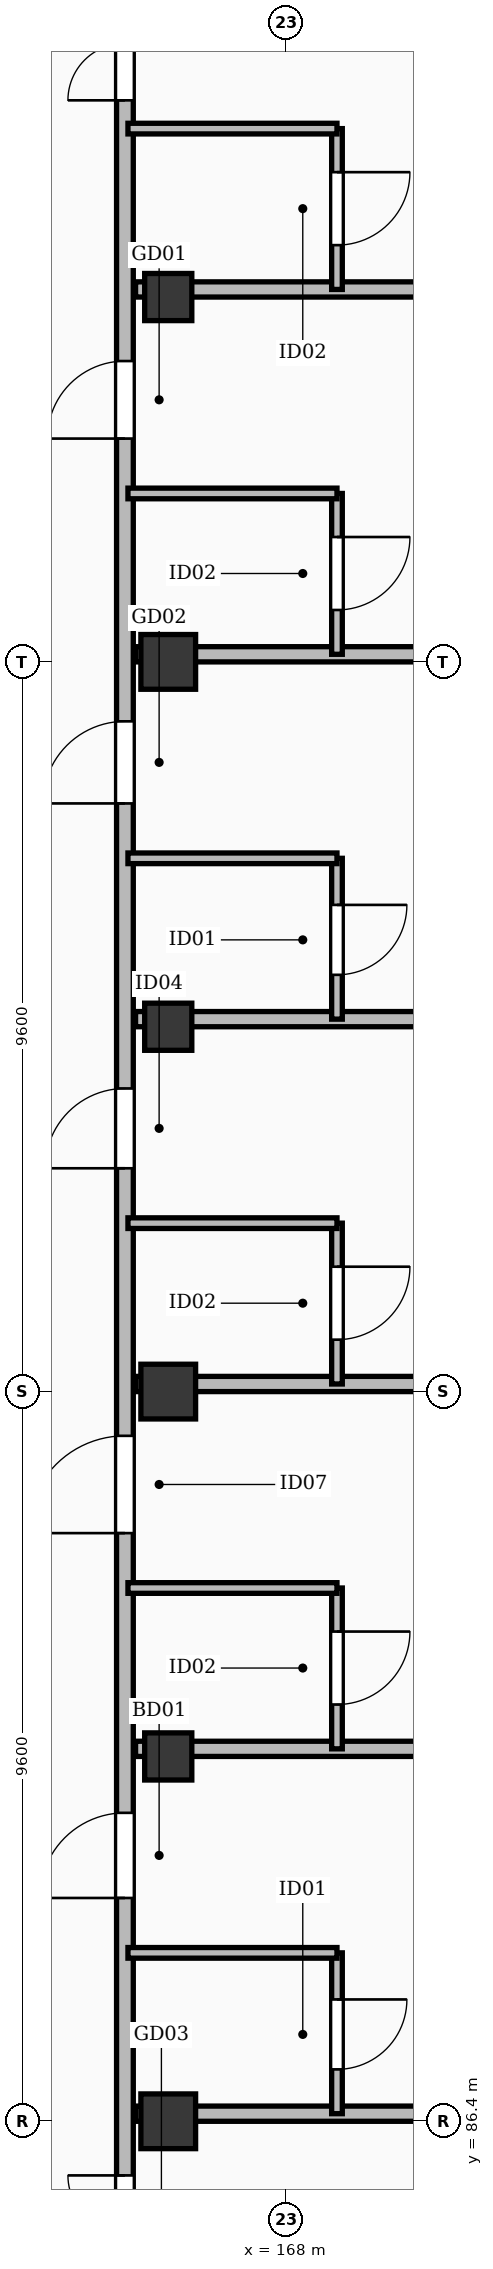
"""IFC4 building model, lengths in metres.
Left out: names, types, materials, properties, quantities, classifications, styles, units other than length and angle.
Written with IfcOpenShell. Run it as: python <this file> out.ifc"""

import sys

from ifc_helpers import new_model, si_unit, direction, frame, frame_2d, origin, origin_2d, place, context, subcontext, project, spatial, rectangle, extrude, element, fill, save


model = new_model("IFC4")
c1 = context("Model", 3, precision=1e-05, world=origin(), true_north=direction((0.0, 1.0)))
c2 = subcontext(c1, "Body", "Model", "MODEL_VIEW")
j1 = project(units=[si_unit("LENGTHUNIT", "METRE"), si_unit("PLANEANGLEUNIT", "RADIAN")], contexts=[c1])
p1 = place(None, origin())
s1 = spatial("IfcSite", under=j1, at=p1, CompositionType="ELEMENT")
p2 = place(p1, origin())
s2 = spatial("IfcBuilding", under=s1, at=p2, CompositionType="ELEMENT")
p3 = place(p2, frame((0.0, 0.0, 31.8)))
s3 = spatial("IfcBuildingStorey", under=s2, at=p3, CompositionType="ELEMENT", Elevation=31.8)
for number, where, z_axis, x_axis in (
    (1, (166.45, 86.4, 0.0), (0.0, 0.0, 1.0), (1.0, 0.0, 0.0)),
    (2, (166.45, 96.0, 0.0), (0.0, 0.0, 1.0), (1.0, 0.0, 0.0)),
    (3, (166.45, 105.6, 0.0), (0.0, 0.0, 1.0), (1.0, 0.0, 0.0)),
):
    element("IfcColumn", number, at=place(p3, frame(where, z_axis=z_axis, x_axis=x_axis)), inside=s3, PredefinedType="COLUMN", context=c2, shape_type="SweptSolid", body=[
        extrude(rectangle(XDim=0.72, YDim=0.72, at=origin_2d()), origin(), (0.0, 0.0, 1.0), 3.6),
    ])
for number, where, z_axis, x_axis in (
    (4, (166.45, 91.2, 0.0), (0.0, 0.0, 1.0), (1.0, 0.0, 0.0)),
    (5, (166.45, 100.8, 0.0), (0.0, 0.0, 1.0), (1.0, 0.0, 0.0)),
    (6, (166.45, 110.4, 0.0), (0.0, 0.0, 1.0), (1.0, 0.0, 0.0)),
):
    element("IfcColumn", number, at=place(p3, frame(where, z_axis=z_axis, x_axis=x_axis)), inside=s3, PredefinedType="COLUMN", context=c2, shape_type="SweptSolid", body=[
        extrude(rectangle(XDim=0.62, YDim=0.62, at=origin_2d()), origin(), (0.0, 0.0, 1.0), 3.6),
    ])
p4 = place(p3, frame((165.88, 48.35, 0.0), z_axis=(0.0, 0.0, 1.0), x_axis=(0.0, 1.0, 0.0)))
e7 = element("IfcWall", 7, at=p4, inside=s3, PredefinedType="PARTITIONING", context=c2, shape_type="SweptSolid", body=[
    extrude(rectangle(XDim=77.3, YDim=0.22, at=frame_2d((38.65, 0.0))), origin(), (0.0, 0.0, 1.0), 2.602),
])
p5 = place(p4, frame((5.15, 0.0, 0.0)))
e8 = element("IfcOpeningElement", 8, at=p5, cuts=e7, PredefinedType="OPENING", context=c2, shape_type="SweptSolid", body=[
    extrude(rectangle(XDim=1.14, YDim=2.26, at=frame_2d((0.57, 1.13))), frame((0.0, 0.122, 0.0), z_axis=(0.0, -1.0, 0.0), x_axis=(1.0, 0.0, 0.0)), (0.0, 0.0, 1.0), 0.244),
])
p6 = place(p4, frame((12.188, 0.0, 0.0)))
e9 = element("IfcOpeningElement", 9, at=p6, cuts=e7, PredefinedType="OPENING", context=c2, shape_type="SweptSolid", body=[
    extrude(rectangle(XDim=1.12, YDim=2.15, at=frame_2d((0.56, 1.075))), frame((0.0, 0.122, 0.0), z_axis=(0.0, -1.0, 0.0), x_axis=(1.0, 0.0, 0.0)), (0.0, 0.0, 1.0), 0.244),
])
p7 = place(p4, frame((16.988, 0.0, 0.0)))
e10 = element("IfcOpeningElement", 10, at=p7, cuts=e7, PredefinedType="OPENING", context=c2, shape_type="SweptSolid", body=[
    extrude(rectangle(XDim=1.28, YDim=2.16, at=frame_2d((0.64, 1.08))), frame((0.0, 0.122, 0.0), z_axis=(0.0, -1.0, 0.0), x_axis=(1.0, 0.0, 0.0)), (0.0, 0.0, 1.0), 0.244),
])
p8 = place(p4, frame((21.788, 0.0, 0.0)))
e11 = element("IfcOpeningElement", 11, at=p8, cuts=e7, PredefinedType="OPENING", context=c2, shape_type="SweptSolid", body=[
    extrude(rectangle(XDim=1.05, YDim=2.18, at=frame_2d((0.525, 1.09))), frame((0.0, 0.122, 0.0), z_axis=(0.0, -1.0, 0.0), x_axis=(1.0, 0.0, 0.0)), (0.0, 0.0, 1.0), 0.244),
])
p9 = place(p4, frame((26.588, 0.0, 0.0)))
e12 = element("IfcOpeningElement", 12, at=p9, cuts=e7, PredefinedType="OPENING", context=c2, shape_type="SweptSolid", body=[
    extrude(rectangle(XDim=1.08, YDim=2.25, at=frame_2d((0.54, 1.125))), frame((0.0, 0.122, 0.0), z_axis=(0.0, -1.0, 0.0), x_axis=(1.0, 0.0, 0.0)), (0.0, 0.0, 1.0), 0.244),
])
p10 = place(p4, frame((31.388, 0.0, 0.0)))
e13 = element("IfcOpeningElement", 13, at=p10, cuts=e7, PredefinedType="OPENING", context=c2, shape_type="SweptSolid", body=[
    extrude(rectangle(XDim=1.02, YDim=2.2, at=frame_2d((0.51, 1.1))), frame((0.0, 0.122, 0.0), z_axis=(0.0, -1.0, 0.0), x_axis=(1.0, 0.0, 0.0)), (0.0, 0.0, 1.0), 0.244),
])
p11 = place(p4, frame((35.838, 0.0, 0.0)))
e14 = element("IfcOpeningElement", 14, at=p11, cuts=e7, PredefinedType="OPENING", context=c2, shape_type="SweptSolid", body=[
    extrude(rectangle(XDim=1.5, YDim=2.3, at=frame_2d((0.75, 1.15))), frame((0.0, 0.122, 0.0), z_axis=(0.0, -1.0, 0.0), x_axis=(1.0, 0.0, 0.0)), (0.0, 0.0, 1.0), 0.244),
])
p12 = place(p4, frame((40.988, 0.0, 0.0)))
e15 = element("IfcOpeningElement", 15, at=p12, cuts=e7, PredefinedType="OPENING", context=c2, shape_type="SweptSolid", body=[
    extrude(rectangle(XDim=1.12, YDim=2.15, at=frame_2d((0.56, 1.075))), frame((0.0, 0.122, 0.0), z_axis=(0.0, -1.0, 0.0), x_axis=(1.0, 0.0, 0.0)), (0.0, 0.0, 1.0), 0.244),
])
p13 = place(p4, frame((45.788, 0.0, 0.0)))
e16 = element("IfcOpeningElement", 16, at=p13, cuts=e7, PredefinedType="OPENING", context=c2, shape_type="SweptSolid", body=[
    extrude(rectangle(XDim=1.28, YDim=2.16, at=frame_2d((0.64, 1.08))), frame((0.0, 0.122, 0.0), z_axis=(0.0, -1.0, 0.0), x_axis=(1.0, 0.0, 0.0)), (0.0, 0.0, 1.0), 0.244),
])
p14 = place(p4, frame((50.588, 0.0, 0.0)))
e17 = element("IfcOpeningElement", 17, at=p14, cuts=e7, PredefinedType="OPENING", context=c2, shape_type="SweptSolid", body=[
    extrude(rectangle(XDim=1.05, YDim=2.18, at=frame_2d((0.525, 1.09))), frame((0.0, 0.122, 0.0), z_axis=(0.0, -1.0, 0.0), x_axis=(1.0, 0.0, 0.0)), (0.0, 0.0, 1.0), 0.244),
])
p15 = place(p4, frame((55.388, 0.0, 0.0)))
e18 = element("IfcOpeningElement", 18, at=p15, cuts=e7, PredefinedType="OPENING", context=c2, shape_type="SweptSolid", body=[
    extrude(rectangle(XDim=1.08, YDim=2.25, at=frame_2d((0.54, 1.125))), frame((0.0, 0.122, 0.0), z_axis=(0.0, -1.0, 0.0), x_axis=(1.0, 0.0, 0.0)), (0.0, 0.0, 1.0), 0.244),
])
p16 = place(p4, frame((60.188, 0.0, 0.0)))
e19 = element("IfcOpeningElement", 19, at=p16, cuts=e7, PredefinedType="OPENING", context=c2, shape_type="SweptSolid", body=[
    extrude(rectangle(XDim=1.02, YDim=2.2, at=frame_2d((0.51, 1.1))), frame((0.0, 0.122, 0.0), z_axis=(0.0, -1.0, 0.0), x_axis=(1.0, 0.0, 0.0)), (0.0, 0.0, 1.0), 0.244),
])
p17 = place(p4, frame((64.638, 0.0, 0.0)))
e20 = element("IfcOpeningElement", 20, at=p17, cuts=e7, PredefinedType="OPENING", context=c2, shape_type="SweptSolid", body=[
    extrude(rectangle(XDim=1.5, YDim=2.3, at=frame_2d((0.75, 1.15))), frame((0.0, 0.122, 0.0), z_axis=(0.0, -1.0, 0.0), x_axis=(1.0, 0.0, 0.0)), (0.0, 0.0, 1.0), 0.244),
])
p18 = place(p4, frame((69.788, 0.0, 0.0)))
e21 = element("IfcOpeningElement", 21, at=p18, cuts=e7, PredefinedType="OPENING", context=c2, shape_type="SweptSolid", body=[
    extrude(rectangle(XDim=1.12, YDim=2.15, at=frame_2d((0.56, 1.075))), frame((0.0, 0.122, 0.0), z_axis=(0.0, -1.0, 0.0), x_axis=(1.0, 0.0, 0.0)), (0.0, 0.0, 1.0), 0.244),
])
p19 = place(p4, frame((74.588, 0.0, 0.0)))
e22 = element("IfcOpeningElement", 22, at=p19, cuts=e7, PredefinedType="OPENING", context=c2, shape_type="SweptSolid", body=[
    extrude(rectangle(XDim=1.28, YDim=2.16, at=frame_2d((0.64, 1.08))), frame((0.0, 0.122, 0.0), z_axis=(0.0, -1.0, 0.0), x_axis=(1.0, 0.0, 0.0)), (0.0, 0.0, 1.0), 0.244),
])
p20 = place(p3, frame((166.02, 86.5, 0.0), z_axis=(0.0, 0.0, 1.0), x_axis=(1.0, 0.0, 0.0)))
e23 = element("IfcWall", 23, at=p20, inside=s3, PredefinedType="PARTITIONING", context=c2, shape_type="SweptSolid", body=[
    extrude(rectangle(XDim=13.23, YDim=0.2, at=frame_2d((6.615, 0.0))), origin(), (0.0, 0.0, 1.0), 2.602),
])
p21 = place(p3, frame((168.67, 86.5, 0.0), z_axis=(0.0, 0.0, 1.0), x_axis=(0.0, 1.0, 0.0)))
e24 = element("IfcWall", 24, at=p21, inside=s3, PredefinedType="PARTITIONING", context=c2, shape_type="SweptSolid", body=[
    extrude(rectangle(XDim=2.116, YDim=0.14, at=frame_2d((1.058, 0.0))), origin(), (0.0, 0.0, 1.0), 2.732),
])
p22 = place(p21, frame((0.583, 0.0, 0.0)))
e25 = element("IfcOpeningElement", 25, at=p22, cuts=e24, PredefinedType="OPENING", context=c2, shape_type="SweptSolid", body=[
    extrude(rectangle(XDim=0.92, YDim=2.1, at=frame_2d((0.46, 1.05))), frame((0.0, 0.082, 0.0), z_axis=(0.0, -1.0, 0.0), x_axis=(1.0, 0.0, 0.0)), (0.0, 0.0, 1.0), 0.164),
])
p23 = place(p3, frame((165.92, 88.616, 0.0), z_axis=(0.0, 0.0, 1.0), x_axis=(1.0, 0.0, 0.0)))
e26 = element("IfcWall", 26, at=p23, inside=s3, PredefinedType="PARTITIONING", context=c2, shape_type="SweptSolid", body=[
    extrude(rectangle(XDim=2.75, YDim=0.14, at=frame_2d((1.375, 0.0))), origin(), (0.0, 0.0, 1.0), 2.732),
])
p24 = place(p3, frame((166.02, 91.3, 0.0), z_axis=(0.0, 0.0, 1.0), x_axis=(1.0, 0.0, 0.0)))
e27 = element("IfcWall", 27, at=p24, inside=s3, PredefinedType="PARTITIONING", context=c2, shape_type="SweptSolid", body=[
    extrude(rectangle(XDim=13.23, YDim=0.2, at=frame_2d((6.615, 0.0))), origin(), (0.0, 0.0, 1.0), 2.602),
])
p25 = place(p3, frame((168.67, 91.3, 0.0), z_axis=(0.0, 0.0, 1.0), x_axis=(0.0, 1.0, 0.0)))
e28 = element("IfcWall", 28, at=p25, inside=s3, PredefinedType="PARTITIONING", context=c2, shape_type="SweptSolid", body=[
    extrude(rectangle(XDim=2.116, YDim=0.14, at=frame_2d((1.058, 0.0))), origin(), (0.0, 0.0, 1.0), 2.732),
])
p26 = place(p25, frame((0.583, 0.0, 0.0)))
e29 = element("IfcOpeningElement", 29, at=p26, cuts=e28, PredefinedType="OPENING", context=c2, shape_type="SweptSolid", body=[
    extrude(rectangle(XDim=0.96, YDim=2.12, at=frame_2d((0.48, 1.06))), frame((0.0, 0.082, 0.0), z_axis=(0.0, -1.0, 0.0), x_axis=(1.0, 0.0, 0.0)), (0.0, 0.0, 1.0), 0.164),
])
p27 = place(p3, frame((165.92, 93.416, 0.0), z_axis=(0.0, 0.0, 1.0), x_axis=(1.0, 0.0, 0.0)))
e30 = element("IfcWall", 30, at=p27, inside=s3, PredefinedType="PARTITIONING", context=c2, shape_type="SweptSolid", body=[
    extrude(rectangle(XDim=2.75, YDim=0.14, at=frame_2d((1.375, 0.0))), origin(), (0.0, 0.0, 1.0), 2.732),
])
p28 = place(p3, frame((166.02, 96.1, 0.0), z_axis=(0.0, 0.0, 1.0), x_axis=(1.0, 0.0, 0.0)))
e31 = element("IfcWall", 31, at=p28, inside=s3, PredefinedType="PARTITIONING", context=c2, shape_type="SweptSolid", body=[
    extrude(rectangle(XDim=13.23, YDim=0.2, at=frame_2d((6.615, 0.0))), origin(), (0.0, 0.0, 1.0), 2.602),
])
p29 = place(p3, frame((168.67, 96.1, 0.0), z_axis=(0.0, 0.0, 1.0), x_axis=(0.0, 1.0, 0.0)))
e32 = element("IfcWall", 32, at=p29, inside=s3, PredefinedType="PARTITIONING", context=c2, shape_type="SweptSolid", body=[
    extrude(rectangle(XDim=2.116, YDim=0.14, at=frame_2d((1.058, 0.0))), origin(), (0.0, 0.0, 1.0), 2.732),
])
p30 = place(p29, frame((0.583, 0.0, 0.0)))
e33 = element("IfcOpeningElement", 33, at=p30, cuts=e32, PredefinedType="OPENING", context=c2, shape_type="SweptSolid", body=[
    extrude(rectangle(XDim=0.96, YDim=2.12, at=frame_2d((0.48, 1.06))), frame((0.0, 0.082, 0.0), z_axis=(0.0, -1.0, 0.0), x_axis=(1.0, 0.0, 0.0)), (0.0, 0.0, 1.0), 0.164),
])
p31 = place(p3, frame((165.92, 98.216, 0.0), z_axis=(0.0, 0.0, 1.0), x_axis=(1.0, 0.0, 0.0)))
e34 = element("IfcWall", 34, at=p31, inside=s3, PredefinedType="PARTITIONING", context=c2, shape_type="SweptSolid", body=[
    extrude(rectangle(XDim=2.75, YDim=0.14, at=frame_2d((1.375, 0.0))), origin(), (0.0, 0.0, 1.0), 2.732),
])
p32 = place(p3, frame((166.02, 100.9, 0.0), z_axis=(0.0, 0.0, 1.0), x_axis=(1.0, 0.0, 0.0)))
e35 = element("IfcWall", 35, at=p32, inside=s3, PredefinedType="PARTITIONING", context=c2, shape_type="SweptSolid", body=[
    extrude(rectangle(XDim=13.23, YDim=0.2, at=frame_2d((6.615, 0.0))), origin(), (0.0, 0.0, 1.0), 2.602),
])
p33 = place(p3, frame((168.67, 100.9, 0.0), z_axis=(0.0, 0.0, 1.0), x_axis=(0.0, 1.0, 0.0)))
e36 = element("IfcWall", 36, at=p33, inside=s3, PredefinedType="PARTITIONING", context=c2, shape_type="SweptSolid", body=[
    extrude(rectangle(XDim=2.116, YDim=0.14, at=frame_2d((1.058, 0.0))), origin(), (0.0, 0.0, 1.0), 2.732),
])
p34 = place(p33, frame((0.583, 0.0, 0.0)))
e37 = element("IfcOpeningElement", 37, at=p34, cuts=e36, PredefinedType="OPENING", context=c2, shape_type="SweptSolid", body=[
    extrude(rectangle(XDim=0.92, YDim=2.1, at=frame_2d((0.46, 1.05))), frame((0.0, 0.082, 0.0), z_axis=(0.0, -1.0, 0.0), x_axis=(1.0, 0.0, 0.0)), (0.0, 0.0, 1.0), 0.164),
])
p35 = place(p3, frame((165.92, 103.016, 0.0), z_axis=(0.0, 0.0, 1.0), x_axis=(1.0, 0.0, 0.0)))
e38 = element("IfcWall", 38, at=p35, inside=s3, PredefinedType="PARTITIONING", context=c2, shape_type="SweptSolid", body=[
    extrude(rectangle(XDim=2.75, YDim=0.14, at=frame_2d((1.375, 0.0))), origin(), (0.0, 0.0, 1.0), 2.732),
])
p36 = place(p3, frame((166.02, 105.7, 0.0), z_axis=(0.0, 0.0, 1.0), x_axis=(1.0, 0.0, 0.0)))
e39 = element("IfcWall", 39, at=p36, inside=s3, PredefinedType="PARTITIONING", context=c2, shape_type="SweptSolid", body=[
    extrude(rectangle(XDim=13.23, YDim=0.2, at=frame_2d((6.615, 0.0))), origin(), (0.0, 0.0, 1.0), 2.602),
])
p37 = place(p3, frame((168.67, 105.7, 0.0), z_axis=(0.0, 0.0, 1.0), x_axis=(0.0, 1.0, 0.0)))
e40 = element("IfcWall", 40, at=p37, inside=s3, PredefinedType="PARTITIONING", context=c2, shape_type="SweptSolid", body=[
    extrude(rectangle(XDim=2.116, YDim=0.14, at=frame_2d((1.058, 0.0))), origin(), (0.0, 0.0, 1.0), 2.732),
])
p38 = place(p37, frame((0.583, 0.0, 0.0)))
e41 = element("IfcOpeningElement", 41, at=p38, cuts=e40, PredefinedType="OPENING", context=c2, shape_type="SweptSolid", body=[
    extrude(rectangle(XDim=0.96, YDim=2.12, at=frame_2d((0.48, 1.06))), frame((0.0, 0.082, 0.0), z_axis=(0.0, -1.0, 0.0), x_axis=(1.0, 0.0, 0.0)), (0.0, 0.0, 1.0), 0.164),
])
p39 = place(p3, frame((165.92, 107.816, 0.0), z_axis=(0.0, 0.0, 1.0), x_axis=(1.0, 0.0, 0.0)))
e42 = element("IfcWall", 42, at=p39, inside=s3, PredefinedType="PARTITIONING", context=c2, shape_type="SweptSolid", body=[
    extrude(rectangle(XDim=2.75, YDim=0.14, at=frame_2d((1.375, 0.0))), origin(), (0.0, 0.0, 1.0), 2.732),
])
p40 = place(p3, frame((166.02, 110.5, 0.0), z_axis=(0.0, 0.0, 1.0), x_axis=(1.0, 0.0, 0.0)))
e43 = element("IfcWall", 43, at=p40, inside=s3, PredefinedType="PARTITIONING", context=c2, shape_type="SweptSolid", body=[
    extrude(rectangle(XDim=13.23, YDim=0.2, at=frame_2d((6.615, 0.0))), origin(), (0.0, 0.0, 1.0), 2.602),
])
p41 = place(p3, frame((168.67, 110.5, 0.0), z_axis=(0.0, 0.0, 1.0), x_axis=(0.0, 1.0, 0.0)))
e44 = element("IfcWall", 44, at=p41, inside=s3, PredefinedType="PARTITIONING", context=c2, shape_type="SweptSolid", body=[
    extrude(rectangle(XDim=2.116, YDim=0.14, at=frame_2d((1.058, 0.0))), origin(), (0.0, 0.0, 1.0), 2.732),
])
p42 = place(p41, frame((0.583, 0.0, 0.0)))
e45 = element("IfcOpeningElement", 45, at=p42, cuts=e44, PredefinedType="OPENING", context=c2, shape_type="SweptSolid", body=[
    extrude(rectangle(XDim=0.96, YDim=2.12, at=frame_2d((0.48, 1.06))), frame((0.0, 0.082, 0.0), z_axis=(0.0, -1.0, 0.0), x_axis=(1.0, 0.0, 0.0)), (0.0, 0.0, 1.0), 0.164),
])
p43 = place(p3, frame((165.92, 112.616, 0.0), z_axis=(0.0, 0.0, 1.0), x_axis=(1.0, 0.0, 0.0)))
e46 = element("IfcWall", 46, at=p43, inside=s3, PredefinedType="PARTITIONING", context=c2, shape_type="SweptSolid", body=[
    extrude(rectangle(XDim=2.75, YDim=0.14, at=frame_2d((1.375, 0.0))), origin(), (0.0, 0.0, 1.0), 2.732),
])
p44 = place(p11, origin())
e47 = element("IfcDoor", 47, at=p44, inside=s3, OperationType="DOUBLE_DOOR_SINGLE_SWING", PredefinedType="DOOR", context=c2, shape_type="SweptSolid", body=[
    extrude(rectangle(XDim=1.5, YDim=2.3, at=frame_2d((0.75, 1.15))), frame((0.0, 0.025, 0.0), z_axis=(0.0, -1.0, 0.0), x_axis=(1.0, 0.0, 0.0)), (0.0, 0.0, 1.0), 0.05),
])
fill(e14, e47)
p45 = place(p12, origin())
e48 = element("IfcDoor", 48, at=p45, inside=s3, OperationType="SINGLE_SWING_LEFT", PredefinedType="DOOR", context=c2, shape_type="SweptSolid", body=[
    extrude(rectangle(XDim=1.12, YDim=2.15, at=frame_2d((0.56, 1.075))), frame((0.0, 0.025, 0.0), z_axis=(0.0, -1.0, 0.0), x_axis=(1.0, 0.0, 0.0)), (0.0, 0.0, 1.0), 0.05),
])
fill(e15, e48)
p46 = place(p22, frame((0.92, 0.0, 0.0), z_axis=(0.0, 0.0, 1.0), x_axis=(-1.0, 0.0, 0.0)))
e49 = element("IfcDoor", 49, at=p46, inside=s3, OperationType="SINGLE_SWING_RIGHT", PredefinedType="DOOR", context=c2, shape_type="SweptSolid", body=[
    extrude(rectangle(XDim=0.92, YDim=2.1, at=frame_2d((0.46, 1.05))), frame((0.0, 0.025, 0.0), z_axis=(0.0, -1.0, 0.0), x_axis=(1.0, 0.0, 0.0)), (0.0, 0.0, 1.0), 0.05),
])
fill(e25, e49)
p47 = place(p13, origin())
e50 = element("IfcDoor", 50, at=p47, inside=s3, OperationType="SINGLE_SWING_LEFT", PredefinedType="DOOR", context=c2, shape_type="SweptSolid", body=[
    extrude(rectangle(XDim=1.28, YDim=2.16, at=frame_2d((0.64, 1.08))), frame((0.0, 0.025, 0.0), z_axis=(0.0, -1.0, 0.0), x_axis=(1.0, 0.0, 0.0)), (0.0, 0.0, 1.0), 0.05),
])
fill(e16, e50)
p48 = place(p26, frame((0.96, 0.0, 0.0), z_axis=(0.0, 0.0, 1.0), x_axis=(-1.0, 0.0, 0.0)))
e51 = element("IfcDoor", 51, at=p48, inside=s3, OperationType="SINGLE_SWING_RIGHT", PredefinedType="DOOR", context=c2, shape_type="SweptSolid", body=[
    extrude(rectangle(XDim=0.96, YDim=2.12, at=frame_2d((0.48, 1.06))), frame((0.0, 0.025, 0.0), z_axis=(0.0, -1.0, 0.0), x_axis=(1.0, 0.0, 0.0)), (0.0, 0.0, 1.0), 0.05),
])
fill(e29, e51)
p49 = place(p14, origin())
e52 = element("IfcDoor", 52, at=p49, inside=s3, OperationType="SINGLE_SWING_LEFT", PredefinedType="DOOR", context=c2, shape_type="SweptSolid", body=[
    extrude(rectangle(XDim=1.05, YDim=2.18, at=frame_2d((0.525, 1.09))), frame((0.0, 0.025, 0.0), z_axis=(0.0, -1.0, 0.0), x_axis=(1.0, 0.0, 0.0)), (0.0, 0.0, 1.0), 0.05),
])
fill(e17, e52)
p50 = place(p30, frame((0.96, 0.0, 0.0), z_axis=(0.0, 0.0, 1.0), x_axis=(-1.0, 0.0, 0.0)))
e53 = element("IfcDoor", 53, at=p50, inside=s3, OperationType="SINGLE_SWING_RIGHT", PredefinedType="DOOR", context=c2, shape_type="SweptSolid", body=[
    extrude(rectangle(XDim=0.96, YDim=2.12, at=frame_2d((0.48, 1.06))), frame((0.0, 0.025, 0.0), z_axis=(0.0, -1.0, 0.0), x_axis=(1.0, 0.0, 0.0)), (0.0, 0.0, 1.0), 0.05),
])
fill(e33, e53)
p51 = place(p15, origin())
e54 = element("IfcDoor", 54, at=p51, inside=s3, OperationType="SINGLE_SWING_LEFT", PredefinedType="DOOR", context=c2, shape_type="SweptSolid", body=[
    extrude(rectangle(XDim=1.08, YDim=2.25, at=frame_2d((0.54, 1.125))), frame((0.0, 0.025, 0.0), z_axis=(0.0, -1.0, 0.0), x_axis=(1.0, 0.0, 0.0)), (0.0, 0.0, 1.0), 0.05),
])
fill(e18, e54)
p52 = place(p34, frame((0.92, 0.0, 0.0), z_axis=(0.0, 0.0, 1.0), x_axis=(-1.0, 0.0, 0.0)))
e55 = element("IfcDoor", 55, at=p52, inside=s3, OperationType="SINGLE_SWING_RIGHT", PredefinedType="DOOR", context=c2, shape_type="SweptSolid", body=[
    extrude(rectangle(XDim=0.92, YDim=2.1, at=frame_2d((0.46, 1.05))), frame((0.0, 0.025, 0.0), z_axis=(0.0, -1.0, 0.0), x_axis=(1.0, 0.0, 0.0)), (0.0, 0.0, 1.0), 0.05),
])
fill(e37, e55)
p53 = place(p16, origin())
e56 = element("IfcDoor", 56, at=p53, inside=s3, OperationType="SINGLE_SWING_LEFT", PredefinedType="DOOR", context=c2, shape_type="SweptSolid", body=[
    extrude(rectangle(XDim=1.02, YDim=2.2, at=frame_2d((0.51, 1.1))), frame((0.0, 0.025, 0.0), z_axis=(0.0, -1.0, 0.0), x_axis=(1.0, 0.0, 0.0)), (0.0, 0.0, 1.0), 0.05),
])
fill(e19, e56)
p54 = place(p38, frame((0.96, 0.0, 0.0), z_axis=(0.0, 0.0, 1.0), x_axis=(-1.0, 0.0, 0.0)))
e57 = element("IfcDoor", 57, at=p54, inside=s3, OperationType="SINGLE_SWING_RIGHT", PredefinedType="DOOR", context=c2, shape_type="SweptSolid", body=[
    extrude(rectangle(XDim=0.96, YDim=2.12, at=frame_2d((0.48, 1.06))), frame((0.0, 0.025, 0.0), z_axis=(0.0, -1.0, 0.0), x_axis=(1.0, 0.0, 0.0)), (0.0, 0.0, 1.0), 0.05),
])
fill(e41, e57)
p55 = place(p17, origin())
e58 = element("IfcDoor", 58, at=p55, inside=s3, OperationType="DOUBLE_DOOR_SINGLE_SWING", PredefinedType="DOOR", context=c2, shape_type="SweptSolid", body=[
    extrude(rectangle(XDim=1.5, YDim=2.3, at=frame_2d((0.75, 1.15))), frame((0.0, 0.025, 0.0), z_axis=(0.0, -1.0, 0.0), x_axis=(1.0, 0.0, 0.0)), (0.0, 0.0, 1.0), 0.05),
])
fill(e20, e58)
p56 = place(p42, frame((0.96, 0.0, 0.0), z_axis=(0.0, 0.0, 1.0), x_axis=(-1.0, 0.0, 0.0)))
e59 = element("IfcDoor", 59, at=p56, inside=s3, OperationType="SINGLE_SWING_RIGHT", PredefinedType="DOOR", context=c2, shape_type="SweptSolid", body=[
    extrude(rectangle(XDim=0.96, YDim=2.12, at=frame_2d((0.48, 1.06))), frame((0.0, 0.025, 0.0), z_axis=(0.0, -1.0, 0.0), x_axis=(1.0, 0.0, 0.0)), (0.0, 0.0, 1.0), 0.05),
])
fill(e45, e59)
save(model, sys.argv[1])
